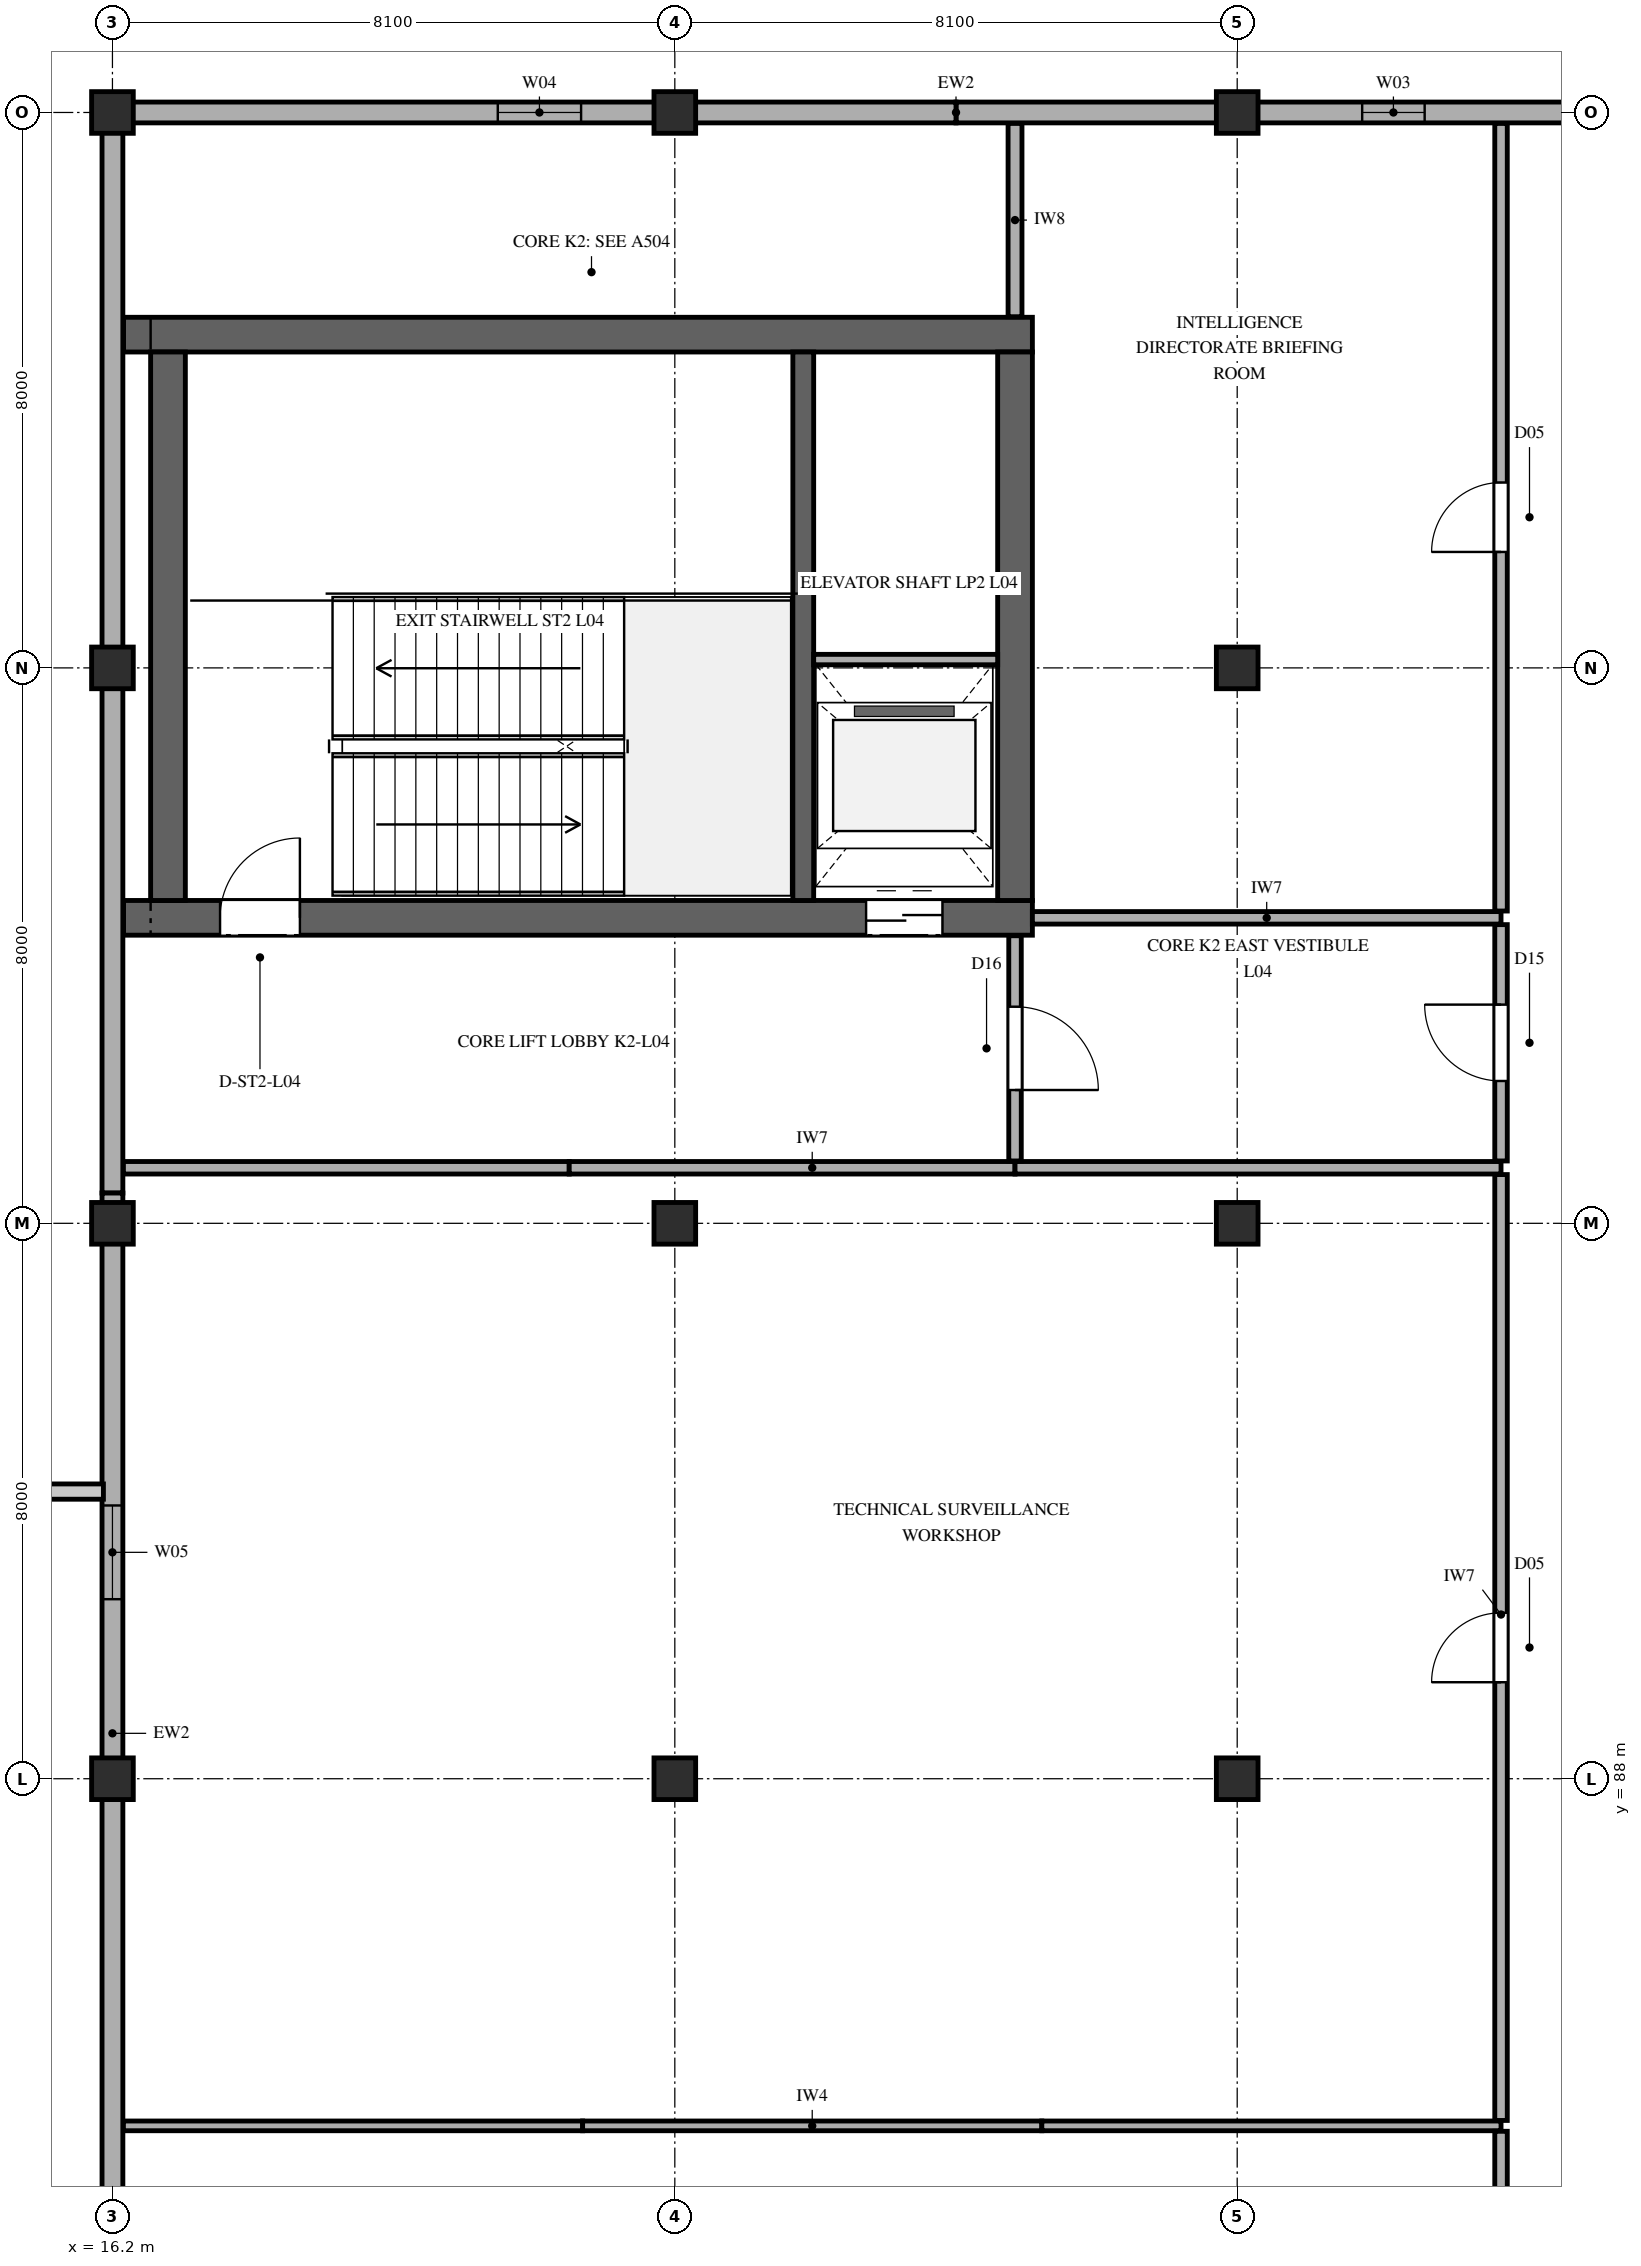
"""IFC4 building model, lengths in metres.
Left out: names, types, materials, properties, quantities, classifications, styles, units other than length and angle.
Written with IfcOpenShell. Run it as: python <this file> out.ifc"""

import sys

from ifc_helpers import new_model, si_unit, direction, frame, frame_2d, origin, origin_2d, place, context, subcontext, project, spatial, rectangle, extrude, element, fill, save


model = new_model("IFC4")
c1 = context("Model", 3, precision=1e-05, world=origin(), true_north=direction((0.0, 1.0)))
c2 = subcontext(c1, "Body", "Model", "MODEL_VIEW")
j1 = project(units=[si_unit("LENGTHUNIT", "METRE"), si_unit("PLANEANGLEUNIT", "RADIAN")], contexts=[c1])
p1 = place(None, origin())
s1 = spatial("IfcSite", under=j1, at=p1, CompositionType="ELEMENT")
p2 = place(p1, origin())
s2 = spatial("IfcBuilding", under=s1, at=p2, CompositionType="ELEMENT")
p3 = place(p2, frame((0.0, 0.0, 19.8)))
s3 = spatial("IfcBuildingStorey", under=s2, at=p3, CompositionType="ELEMENT", Elevation=19.8)
p4 = place(p3, frame((16.36, 100.4, 0.0), z_axis=(0.0, 0.0, 1.0), x_axis=(1.0, 0.0, 0.0)))
e1 = element("IfcWall", 1, at=p4, inside=s3, PredefinedType="SHEAR", context=c2, shape_type="SweptSolid", body=[
    extrude(rectangle(XDim=13.09, YDim=0.5, at=frame_2d((6.545, 0.0))), origin(), (0.0, 0.0, 1.0), 5.1),
])
p5 = place(p4, frame((1.39, 0.0, 0.0)))
e2 = element("IfcOpeningElement", 2, at=p5, cuts=e1, PredefinedType="OPENING", context=c2, shape_type="SweptSolid", body=[
    extrude(rectangle(XDim=1.15, YDim=2.25, at=frame_2d((0.575, 1.125))), frame((0.0, 0.26, 0.0), z_axis=(0.0, -1.0, 0.0), x_axis=(1.0, 0.0, 0.0)), (0.0, 0.0, 1.0), 0.52),
])
p6 = place(p4, frame((10.695, 0.0, 0.0)))
e3 = element("IfcOpeningElement", 3, at=p6, cuts=e1, PredefinedType="OPENING", context=c2, shape_type="SweptSolid", body=[
    extrude(rectangle(XDim=1.1, YDim=2.2, at=frame_2d((0.55, 1.1))), frame((0.0, 0.26, 0.0), z_axis=(0.0, -1.0, 0.0), x_axis=(1.0, 0.0, 0.0)), (0.0, 0.0, 1.0), 0.52),
])
p7 = place(p3, frame((16.36, 108.8, 0.0), z_axis=(0.0, 0.0, 1.0), x_axis=(1.0, 0.0, 0.0)))
e4 = element("IfcWall", 4, at=p7, inside=s3, PredefinedType="SHEAR", context=c2, shape_type="SweptSolid", body=[
    extrude(rectangle(XDim=13.09, YDim=0.5, at=frame_2d((6.545, 0.0))), origin(), (0.0, 0.0, 1.0), 5.1),
])
for number, where, z_axis, x_axis in (
    (5, (17.0, 100.65, 0.0), (0.0, 0.0, 1.0), (0.0, 1.0, 0.0)),
    (6, (29.2, 100.65, 0.0), (0.0, 0.0, 1.0), (0.0, 1.0, 0.0)),
):
    element("IfcWall", number, at=place(p3, frame(where, z_axis=z_axis, x_axis=x_axis)), inside=s3, PredefinedType="SHEAR", context=c2, shape_type="SweptSolid", body=[
        extrude(rectangle(XDim=7.9, YDim=0.5, at=frame_2d((3.95, 0.0))), origin(), (0.0, 0.0, 1.0), 5.1),
    ])
p8 = place(p3, frame((26.15, 100.65, 0.0), z_axis=(0.0, 0.0, 1.0), x_axis=(0.0, 1.0, 0.0)))
e7 = element("IfcWall", 7, at=p8, inside=s3, PredefinedType="SHEAR", context=c2, shape_type="SweptSolid", body=[
    extrude(rectangle(XDim=7.9, YDim=0.3, at=frame_2d((3.95, 0.0))), origin(), (0.0, 0.0, 1.0), 5.1),
])
for number, where, z_axis, x_axis in (
    (8, (16.2, 88.0, 0.0), (0.0, 0.0, 1.0), (1.0, 0.0, 0.0)),
    (9, (16.2, 96.0, 0.0), (0.0, 0.0, 1.0), (1.0, 0.0, 0.0)),
    (10, (16.2, 104.0, 0.0), (0.0, 0.0, 1.0), (1.0, 0.0, 0.0)),
    (11, (16.2, 112.0, 0.0), (0.0, 0.0, 1.0), (1.0, 0.0, 0.0)),
    (12, (24.3, 88.0, 0.0), (0.0, 0.0, 1.0), (1.0, 0.0, 0.0)),
    (13, (24.3, 96.0, 0.0), (0.0, 0.0, 1.0), (1.0, 0.0, 0.0)),
    (14, (24.3, 112.0, 0.0), (0.0, 0.0, 1.0), (1.0, 0.0, 0.0)),
    (15, (32.4, 88.0, 0.0), (0.0, 0.0, 1.0), (1.0, 0.0, 0.0)),
    (16, (32.4, 96.0, 0.0), (0.0, 0.0, 1.0), (1.0, 0.0, 0.0)),
    (17, (32.4, 104.0, 0.0), (0.0, 0.0, 1.0), (1.0, 0.0, 0.0)),
    (18, (32.4, 112.0, 0.0), (0.0, 0.0, 1.0), (1.0, 0.0, 0.0)),
):
    element("IfcColumn", number, at=place(p3, frame(where, z_axis=z_axis, x_axis=x_axis)), inside=s3, PredefinedType="COLUMN", context=c2, shape_type="SweptSolid", body=[
        extrude(rectangle(XDim=0.6, YDim=0.6, at=origin_2d()), origin(), (0.0, 0.0, 1.0), 5.1),
    ])
p9 = place(p3, frame((40.5, 112.0, 0.0), z_axis=(0.0, 0.0, 1.0), x_axis=(-1.0, 0.0, 0.0)))
e19 = element("IfcWall", 19, at=p9, inside=s3, PredefinedType="SOLIDWALL", context=c2, shape_type="SweptSolid", body=[
    extrude(rectangle(XDim=12.15, YDim=0.3, at=frame_2d((6.075, 0.0))), origin(), (0.0, 0.0, 1.0), 4.302),
])
p10 = place(p9, frame((5.4, 0.0, 0.85)))
e20 = element("IfcOpeningElement", 20, at=p10, cuts=e19, PredefinedType="OPENING", context=c2, shape_type="SweptSolid", body=[
    extrude(rectangle(XDim=0.9, YDim=2.4, at=frame_2d((0.45, 1.2))), frame((0.0, 0.16, 0.0), z_axis=(0.0, -1.0, 0.0), x_axis=(1.0, 0.0, 0.0)), (0.0, 0.0, 1.0), 0.32),
])
p11 = place(p3, frame((28.35, 112.0, 0.0), z_axis=(0.0, 0.0, 1.0), x_axis=(-1.0, 0.0, 0.0)))
e21 = element("IfcWall", 21, at=p11, inside=s3, PredefinedType="SOLIDWALL", context=c2, shape_type="SweptSolid", body=[
    extrude(rectangle(XDim=12.15, YDim=0.3, at=frame_2d((6.075, 0.0))), origin(), (0.0, 0.0, 1.0), 4.302),
])
p12 = place(p11, frame((5.4, 0.0, 0.95)))
e22 = element("IfcOpeningElement", 22, at=p12, cuts=e21, PredefinedType="OPENING", context=c2, shape_type="SweptSolid", body=[
    extrude(rectangle(XDim=1.2, YDim=1.8, at=frame_2d((0.6, 0.9))), frame((0.0, 0.16, 0.0), z_axis=(0.0, -1.0, 0.0), x_axis=(1.0, 0.0, 0.0)), (0.0, 0.0, 1.0), 0.32),
])
p13 = place(p3, frame((16.2, 112.0, 0.0), z_axis=(0.0, 0.0, 1.0), x_axis=(0.0, -1.0, 0.0)))
e23 = element("IfcWall", 23, at=p13, inside=s3, PredefinedType="SOLIDWALL", context=c2, shape_type="SweptSolid", body=[
    extrude(rectangle(XDim=15.564, YDim=0.3, at=frame_2d((7.782, 0.0))), origin(), (0.0, 0.0, 1.0), 4.352),
])
p14 = place(p3, frame((16.2, 96.436, 0.0), z_axis=(0.0, 0.0, 1.0), x_axis=(0.0, -1.0, 0.0)))
e24 = element("IfcWall", 24, at=p14, inside=s3, PredefinedType="SOLIDWALL", context=c2, shape_type="SweptSolid", body=[
    extrude(rectangle(XDim=15.564, YDim=0.3, at=frame_2d((7.782, 0.0))), origin(), (0.0, 0.0, 1.0), 4.352),
])
p15 = place(p14, frame((4.5, 0.0, 0.95)))
e25 = element("IfcOpeningElement", 25, at=p15, cuts=e24, PredefinedType="OPENING", context=c2, shape_type="SweptSolid", body=[
    extrude(rectangle(XDim=1.35, YDim=1.8, at=frame_2d((0.675, 0.9))), frame((0.0, 0.16, 0.0), z_axis=(0.0, -1.0, 0.0), x_axis=(1.0, 0.0, 0.0)), (0.0, 0.0, 1.0), 0.32),
])
p16 = place(p3, frame((26.3, 104.12, 0.0), z_axis=(0.0, 0.0, 1.0), x_axis=(1.0, 0.0, 0.0)))
e26 = element("IfcWall", 26, at=p16, inside=s3, PredefinedType="PARTITIONING", context=c2, shape_type="SweptSolid", body=[
    extrude(rectangle(XDim=2.65, YDim=0.15, at=frame_2d((1.325, 0.0))), origin(), (0.0, 0.0, 1.0), 4.86),
])
for number, where, z_axis, x_axis in (
    (27, (16.358, 83.0, 0.0), (0.0, 0.0, 1.0), (1.0, 0.0, 0.0)),
    (28, (22.972, 83.0, 0.0), (0.0, 0.0, 1.0), (1.0, 0.0, 0.0)),
    (29, (29.586, 83.0, 0.0), (0.0, 0.0, 1.0), (1.0, 0.0, 0.0)),
):
    element("IfcWall", number, at=place(p3, frame(where, z_axis=z_axis, x_axis=x_axis)), inside=s3, PredefinedType="PARTITIONING", context=c2, shape_type="SweptSolid", body=[
        extrude(rectangle(XDim=6.614, YDim=0.14, at=frame_2d((3.307, 0.0))), origin(), (0.0, 0.0, 1.0), 4.86),
    ])
p17 = place(p3, frame((16.358, 96.8, 0.0), z_axis=(0.0, 0.0, 1.0), x_axis=(1.0, 0.0, 0.0)))
e30 = element("IfcWall", 30, at=p17, inside=s3, PredefinedType="PARTITIONING", context=c2, shape_type="SweptSolid", body=[
    extrude(rectangle(XDim=6.421, YDim=0.18, at=frame_2d((3.21, 0.0))), origin(), (0.0, 0.0, 1.0), 4.86),
])
p18 = place(p3, frame((22.779, 96.8, 0.0), z_axis=(0.0, 0.0, 1.0), x_axis=(1.0, 0.0, 0.0)))
e31 = element("IfcWall", 31, at=p18, inside=s3, PredefinedType="PARTITIONING", context=c2, shape_type="SweptSolid", body=[
    extrude(rectangle(XDim=6.421, YDim=0.18, at=frame_2d((3.21, 0.0))), origin(), (0.0, 0.0, 1.0), 4.86),
])
p19 = place(p3, frame((29.2, 96.8, 0.0), z_axis=(0.0, 0.0, 1.0), x_axis=(1.0, 0.0, 0.0)))
e32 = element("IfcWall", 32, at=p19, inside=s3, PredefinedType="PARTITIONING", context=c2, shape_type="SweptSolid", body=[
    extrude(rectangle(XDim=7.0, YDim=0.18, at=frame_2d((3.5, 0.0))), origin(), (0.0, 0.0, 1.0), 4.86),
])
p20 = place(p3, frame((29.45, 100.4, 0.0), z_axis=(0.0, 0.0, 1.0), x_axis=(1.0, 0.0, 0.0)))
e33 = element("IfcWall", 33, at=p20, inside=s3, PredefinedType="PARTITIONING", context=c2, shape_type="SweptSolid", body=[
    extrude(rectangle(XDim=6.75, YDim=0.18, at=frame_2d((3.375, 0.0))), origin(), (0.0, 0.0, 1.0), 4.86),
])
p21 = place(p3, frame((29.2, 96.898, 0.0), z_axis=(0.0, 0.0, 1.0), x_axis=(0.0, 1.0, 0.0)))
e34 = element("IfcWall", 34, at=p21, inside=s3, PredefinedType="PARTITIONING", context=c2, shape_type="SweptSolid", body=[
    extrude(rectangle(XDim=3.244, YDim=0.18, at=frame_2d((1.622, 0.0))), origin(), (0.0, 0.0, 1.0), 4.86),
])
p22 = place(p21, frame((1.022, 0.0, 0.0)))
e35 = element("IfcOpeningElement", 35, at=p22, cuts=e34, PredefinedType="OPENING", context=c2, shape_type="SweptSolid", body=[
    extrude(rectangle(XDim=1.2, YDim=2.2, at=frame_2d((0.6, 1.1))), frame((0.0, 0.1, 0.0), z_axis=(0.0, -1.0, 0.0), x_axis=(1.0, 0.0, 0.0)), (0.0, 0.0, 1.0), 0.2),
])
p23 = place(p3, frame((29.2, 109.058, 0.0), z_axis=(0.0, 0.0, 1.0), x_axis=(0.0, 1.0, 0.0)))
e36 = element("IfcWall", 36, at=p23, inside=s3, PredefinedType="PARTITIONING", context=c2, shape_type="SweptSolid", body=[
    extrude(rectangle(XDim=2.784, YDim=0.2, at=frame_2d((1.392, 0.0))), origin(), (0.0, 0.0, 1.0), 4.86),
])
p24 = place(p3, frame((36.2, 68.888, 0.0), z_axis=(0.0, 0.0, 1.0), x_axis=(0.0, 1.0, 0.0)))
e37 = element("IfcWall", 37, at=p24, inside=s3, PredefinedType="PARTITIONING", context=c2, shape_type="SweptSolid", body=[
    extrude(rectangle(XDim=14.034, YDim=0.18, at=frame_2d((7.017, 0.0))), origin(), (0.0, 0.0, 1.0), 4.445),
])
p25 = place(p24, frame((6.517, 0.0, 0.0)))
e38 = element("IfcOpeningElement", 38, at=p25, cuts=e37, PredefinedType="OPENING", context=c2, shape_type="SweptSolid", body=[
    extrude(rectangle(XDim=1.0, YDim=2.2, at=frame_2d((0.5, 1.1))), frame((0.0, 0.1, 0.0), z_axis=(0.0, -1.0, 0.0), x_axis=(1.0, 0.0, 0.0)), (0.0, 0.0, 1.0), 0.2),
])
p26 = place(p3, frame((36.2, 83.078, 0.0), z_axis=(0.0, 0.0, 1.0), x_axis=(0.0, 1.0, 0.0)))
e39 = element("IfcWall", 39, at=p26, inside=s3, PredefinedType="PARTITIONING", context=c2, shape_type="SweptSolid", body=[
    extrude(rectangle(XDim=13.624, YDim=0.18, at=frame_2d((6.812, 0.0))), origin(), (0.0, 0.0, 1.0), 4.445),
])
p27 = place(p26, frame((6.312, 0.0, 0.0)))
e40 = element("IfcOpeningElement", 40, at=p27, cuts=e39, PredefinedType="OPENING", context=c2, shape_type="SweptSolid", body=[
    extrude(rectangle(XDim=1.0, YDim=2.2, at=frame_2d((0.5, 1.1))), frame((0.0, 0.1, 0.0), z_axis=(0.0, -1.0, 0.0), x_axis=(1.0, 0.0, 0.0)), (0.0, 0.0, 1.0), 0.2),
])
p28 = place(p3, frame((36.2, 96.898, 0.0), z_axis=(0.0, 0.0, 1.0), x_axis=(0.0, 1.0, 0.0)))
e41 = element("IfcWall", 41, at=p28, inside=s3, PredefinedType="PARTITIONING", context=c2, shape_type="SweptSolid", body=[
    extrude(rectangle(XDim=3.404, YDim=0.18, at=frame_2d((1.702, 0.0))), origin(), (0.0, 0.0, 1.0), 4.445),
])
p29 = place(p28, frame((1.152, 0.0, 0.0)))
e42 = element("IfcOpeningElement", 42, at=p29, cuts=e41, PredefinedType="OPENING", context=c2, shape_type="SweptSolid", body=[
    extrude(rectangle(XDim=1.1, YDim=2.2, at=frame_2d((0.55, 1.1))), frame((0.0, 0.1, 0.0), z_axis=(0.0, -1.0, 0.0), x_axis=(1.0, 0.0, 0.0)), (0.0, 0.0, 1.0), 0.2),
])
p30 = place(p3, frame((36.2, 100.498, 0.0), z_axis=(0.0, 0.0, 1.0), x_axis=(0.0, 1.0, 0.0)))
e43 = element("IfcWall", 43, at=p30, inside=s3, PredefinedType="PARTITIONING", context=c2, shape_type="SweptSolid", body=[
    extrude(rectangle(XDim=11.344, YDim=0.18, at=frame_2d((5.672, 0.0))), origin(), (0.0, 0.0, 1.0), 4.445),
])
p31 = place(p30, frame((5.172, 0.0, 0.0)))
e44 = element("IfcOpeningElement", 44, at=p31, cuts=e43, PredefinedType="OPENING", context=c2, shape_type="SweptSolid", body=[
    extrude(rectangle(XDim=1.0, YDim=2.2, at=frame_2d((0.5, 1.1))), frame((0.0, 0.1, 0.0), z_axis=(0.0, -1.0, 0.0), x_axis=(1.0, 0.0, 0.0)), (0.0, 0.0, 1.0), 0.2),
])
p32 = place(p10, origin())
e45 = element("IfcWindow", 45, at=p32, inside=s3, PartitioningType="DOUBLE_PANEL_HORIZONTAL", PredefinedType="WINDOW", context=c2, shape_type="SweptSolid", body=[
    extrude(rectangle(XDim=0.9, YDim=2.4, at=frame_2d((0.45, 1.2))), frame((0.0, 0.03, 0.0), z_axis=(0.0, -1.0, 0.0), x_axis=(1.0, 0.0, 0.0)), (0.0, 0.0, 1.0), 0.06),
])
fill(e20, e45)
p33 = place(p12, origin())
e46 = element("IfcWindow", 46, at=p33, inside=s3, PartitioningType="SINGLE_PANEL", PredefinedType="WINDOW", context=c2, shape_type="SweptSolid", body=[
    extrude(rectangle(XDim=1.2, YDim=1.8, at=frame_2d((0.6, 0.9))), frame((0.0, 0.03, 0.0), z_axis=(0.0, -1.0, 0.0), x_axis=(1.0, 0.0, 0.0)), (0.0, 0.0, 1.0), 0.06),
])
fill(e22, e46)
p34 = place(p15, origin())
e47 = element("IfcWindow", 47, at=p34, inside=s3, PartitioningType="DOUBLE_PANEL_VERTICAL", PredefinedType="WINDOW", context=c2, shape_type="SweptSolid", body=[
    extrude(rectangle(XDim=1.35, YDim=1.8, at=frame_2d((0.675, 0.9))), frame((0.0, 0.03, 0.0), z_axis=(0.0, -1.0, 0.0), x_axis=(1.0, 0.0, 0.0)), (0.0, 0.0, 1.0), 0.06),
])
fill(e25, e47)
p35 = place(p5, origin())
e48 = element("IfcDoor", 48, at=p35, inside=s3, OperationType="SINGLE_SWING_RIGHT", PredefinedType="DOOR", context=c2, shape_type="SweptSolid", body=[
    extrude(rectangle(XDim=1.15, YDim=2.25, at=frame_2d((0.575, 1.125))), frame((0.0, 0.025, 0.0), z_axis=(0.0, -1.0, 0.0), x_axis=(1.0, 0.0, 0.0)), (0.0, 0.0, 1.0), 0.05),
])
fill(e2, e48)
p36 = place(p6, frame((1.1, 0.0, 0.0), z_axis=(0.0, 0.0, 1.0), x_axis=(-1.0, 0.0, 0.0)))
e49 = element("IfcDoor", 49, at=p36, inside=s3, OperationType="DOUBLE_DOOR_SLIDING", PredefinedType="DOOR", context=c2, shape_type="SweptSolid", body=[
    extrude(rectangle(XDim=1.1, YDim=2.2, at=frame_2d((0.55, 1.1))), frame((0.0, 0.025, 0.0), z_axis=(0.0, -1.0, 0.0), x_axis=(1.0, 0.0, 0.0)), (0.0, 0.0, 1.0), 0.05),
])
fill(e3, e49)
p37 = place(p22, frame((1.2, 0.0, 0.0), z_axis=(0.0, 0.0, 1.0), x_axis=(-1.0, 0.0, 0.0)))
e50 = element("IfcDoor", 50, at=p37, inside=s3, OperationType="SINGLE_SWING_LEFT", PredefinedType="DOOR", context=c2, shape_type="SweptSolid", body=[
    extrude(rectangle(XDim=1.2, YDim=2.2, at=frame_2d((0.6, 1.1))), frame((0.0, 0.025, 0.0), z_axis=(0.0, -1.0, 0.0), x_axis=(1.0, 0.0, 0.0)), (0.0, 0.0, 1.0), 0.05),
])
fill(e35, e50)
p38 = place(p27, origin())
e51 = element("IfcDoor", 51, at=p38, inside=s3, OperationType="SINGLE_SWING_LEFT", PredefinedType="DOOR", context=c2, shape_type="SweptSolid", body=[
    extrude(rectangle(XDim=1.0, YDim=2.2, at=frame_2d((0.5, 1.1))), frame((0.0, 0.025, 0.0), z_axis=(0.0, -1.0, 0.0), x_axis=(1.0, 0.0, 0.0)), (0.0, 0.0, 1.0), 0.05),
])
fill(e40, e51)
p39 = place(p29, origin())
e52 = element("IfcDoor", 52, at=p39, inside=s3, OperationType="SINGLE_SWING_RIGHT", PredefinedType="DOOR", context=c2, shape_type="SweptSolid", body=[
    extrude(rectangle(XDim=1.1, YDim=2.2, at=frame_2d((0.55, 1.1))), frame((0.0, 0.025, 0.0), z_axis=(0.0, -1.0, 0.0), x_axis=(1.0, 0.0, 0.0)), (0.0, 0.0, 1.0), 0.05),
])
fill(e42, e52)
p40 = place(p31, origin())
e53 = element("IfcDoor", 53, at=p40, inside=s3, OperationType="SINGLE_SWING_LEFT", PredefinedType="DOOR", context=c2, shape_type="SweptSolid", body=[
    extrude(rectangle(XDim=1.0, YDim=2.2, at=frame_2d((0.5, 1.1))), frame((0.0, 0.025, 0.0), z_axis=(0.0, -1.0, 0.0), x_axis=(1.0, 0.0, 0.0)), (0.0, 0.0, 1.0), 0.05),
])
fill(e44, e53)
save(model, sys.argv[1])
